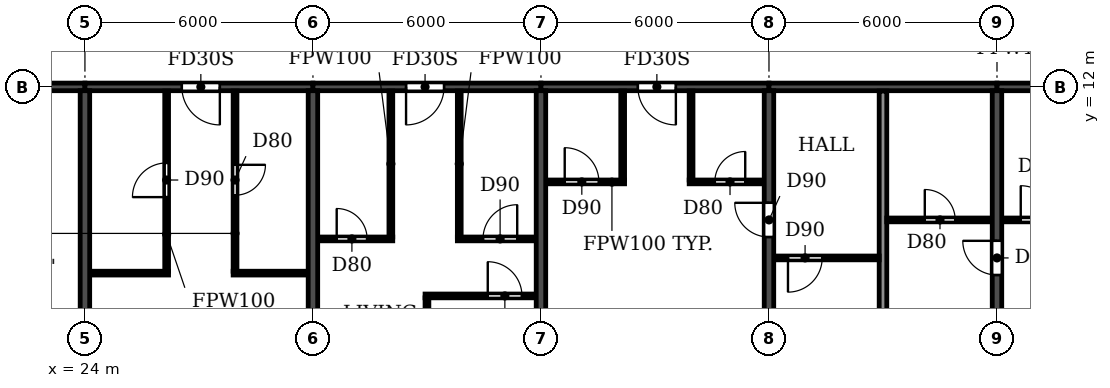
"""IFC4 building model, lengths in metres.
Left out: names, types, materials, properties, quantities, classifications, styles, units other than length and angle.
Written with IfcOpenShell. Run it as: python <this file> out.ifc"""

import sys

from ifc_helpers import new_model, si_unit, direction, frame, frame_2d, origin, place, context, subcontext, project, spatial, rectangle, extrude, element, fill, save


model = new_model("IFC4")
c1 = context("Model", 3, precision=1e-05, world=origin(), true_north=direction((0.0, 1.0)))
c2 = subcontext(c1, "Body", "Model", "MODEL_VIEW")
j1 = project(units=[si_unit("LENGTHUNIT", "METRE"), si_unit("PLANEANGLEUNIT", "RADIAN")], contexts=[c1])
p1 = place(None, origin())
s1 = spatial("IfcSite", under=j1, at=p1, CompositionType="ELEMENT")
p2 = place(p1, origin())
s2 = spatial("IfcBuilding", under=s1, at=p2, CompositionType="ELEMENT")
p3 = place(p2, frame((0.0, 0.0, 175.2)))
s3 = spatial("IfcBuildingStorey", under=s2, at=p3, CompositionType="ELEMENT", Elevation=175.2)
for number, where, z_axis, x_axis in (
    (1, (24.0, 0.2, 0.0), (0.0, 0.0, 1.0), (0.0, 1.0, 0.0)),
    (2, (30.0, 0.2, 0.0), (0.0, 0.0, 1.0), (0.0, 1.0, 0.0)),
    (3, (36.0, 0.2, 0.0), (0.0, 0.0, 1.0), (0.0, 1.0, 0.0)),
):
    element("IfcWall", number, at=place(p3, frame(where, z_axis=z_axis, x_axis=x_axis)), inside=s3, PredefinedType="SHEAR", context=c2, shape_type="SweptSolid", body=[
        extrude(rectangle(XDim=11.7, YDim=0.25, at=frame_2d((5.85, 0.0))), origin(), (0.0, 0.0, 1.0), 3.08),
    ])
p4 = place(p3, frame((42.0, 0.2, 0.0), z_axis=(0.0, 0.0, 1.0), x_axis=(0.0, 1.0, 0.0)))
e4 = element("IfcWall", 4, at=p4, inside=s3, PredefinedType="SHEAR", context=c2, shape_type="SweptSolid", body=[
    extrude(rectangle(XDim=11.7, YDim=0.25, at=frame_2d((5.85, 0.0))), origin(), (0.0, 0.0, 1.0), 3.08),
])
p5 = place(p4, frame((7.85, 0.0, 0.0)))
e5 = element("IfcOpeningElement", 5, at=p5, cuts=e4, PredefinedType="OPENING", context=c2, shape_type="SweptSolid", body=[
    extrude(rectangle(XDim=0.9, YDim=2.1, at=frame_2d((0.45, 1.05))), frame((0.0, 0.135, 0.0), z_axis=(0.0, -1.0, 0.0), x_axis=(1.0, 0.0, 0.0)), (0.0, 0.0, 1.0), 0.27),
])
p6 = place(p3, frame((48.0, 0.2, 0.0), z_axis=(0.0, 0.0, 1.0), x_axis=(0.0, 1.0, 0.0)))
e6 = element("IfcWall", 6, at=p6, inside=s3, PredefinedType="SHEAR", context=c2, shape_type="SweptSolid", body=[
    extrude(rectangle(XDim=11.7, YDim=0.25, at=frame_2d((5.85, 0.0))), origin(), (0.0, 0.0, 1.0), 3.08),
])
p7 = place(p6, frame((6.85, 0.0, 0.0)))
e7 = element("IfcOpeningElement", 7, at=p7, cuts=e6, PredefinedType="OPENING", context=c2, shape_type="SweptSolid", body=[
    extrude(rectangle(XDim=0.9, YDim=2.1, at=frame_2d((0.45, 1.05))), frame((0.0, 0.135, 0.0), z_axis=(0.0, -1.0, 0.0), x_axis=(1.0, 0.0, 0.0)), (0.0, 0.0, 1.0), 0.27),
])
p8 = place(p3, frame((18.2, 12.0, 0.0), z_axis=(0.0, 0.0, 1.0), x_axis=(1.0, 0.0, 0.0)))
e8 = element("IfcWall", 8, at=p8, inside=s3, PredefinedType="SHEAR", context=c2, shape_type="SweptSolid", body=[
    extrude(rectangle(XDim=5.8, YDim=0.2, at=frame_2d((2.9, 0.0))), origin(), (0.0, 0.0, 1.0), 2.48),
])
p9 = place(p8, frame((2.3, 0.0, 0.0)))
e9 = element("IfcOpeningElement", 9, at=p9, cuts=e8, PredefinedType="OPENING", context=c2, shape_type="SweptSolid", body=[
    extrude(rectangle(XDim=1.0, YDim=2.1, at=frame_2d((0.5, 1.05))), frame((0.0, 0.11, 0.0), z_axis=(0.0, -1.0, 0.0), x_axis=(1.0, 0.0, 0.0)), (0.0, 0.0, 1.0), 0.22),
])
p10 = place(p3, frame((24.0, 12.0, 0.0), z_axis=(0.0, 0.0, 1.0), x_axis=(1.0, 0.0, 0.0)))
e10 = element("IfcWall", 10, at=p10, inside=s3, PredefinedType="SHEAR", context=c2, shape_type="SweptSolid", body=[
    extrude(rectangle(XDim=6.0, YDim=0.2, at=frame_2d((3.0, 0.0))), origin(), (0.0, 0.0, 1.0), 2.48),
])
p11 = place(p10, frame((2.55, 0.0, 0.0)))
e11 = element("IfcOpeningElement", 11, at=p11, cuts=e10, PredefinedType="OPENING", context=c2, shape_type="SweptSolid", body=[
    extrude(rectangle(XDim=1.0, YDim=2.1, at=frame_2d((0.5, 1.05))), frame((0.0, 0.11, 0.0), z_axis=(0.0, -1.0, 0.0), x_axis=(1.0, 0.0, 0.0)), (0.0, 0.0, 1.0), 0.22),
])
p12 = place(p3, frame((30.0, 12.0, 0.0), z_axis=(0.0, 0.0, 1.0), x_axis=(1.0, 0.0, 0.0)))
e12 = element("IfcWall", 12, at=p12, inside=s3, PredefinedType="SHEAR", context=c2, shape_type="SweptSolid", body=[
    extrude(rectangle(XDim=6.0, YDim=0.2, at=frame_2d((3.0, 0.0))), origin(), (0.0, 0.0, 1.0), 2.48),
])
p13 = place(p12, frame((2.45, 0.0, 0.0)))
e13 = element("IfcOpeningElement", 13, at=p13, cuts=e12, PredefinedType="OPENING", context=c2, shape_type="SweptSolid", body=[
    extrude(rectangle(XDim=1.0, YDim=2.1, at=frame_2d((0.5, 1.05))), frame((0.0, 0.11, 0.0), z_axis=(0.0, -1.0, 0.0), x_axis=(1.0, 0.0, 0.0)), (0.0, 0.0, 1.0), 0.22),
])
p14 = place(p3, frame((36.0, 12.0, 0.0), z_axis=(0.0, 0.0, 1.0), x_axis=(1.0, 0.0, 0.0)))
e14 = element("IfcWall", 14, at=p14, inside=s3, PredefinedType="SHEAR", context=c2, shape_type="SweptSolid", body=[
    extrude(rectangle(XDim=6.0, YDim=0.2, at=frame_2d((3.0, 0.0))), origin(), (0.0, 0.0, 1.0), 2.48),
])
p15 = place(p14, frame((2.55, 0.0, 0.0)))
e15 = element("IfcOpeningElement", 15, at=p15, cuts=e14, PredefinedType="OPENING", context=c2, shape_type="SweptSolid", body=[
    extrude(rectangle(XDim=1.0, YDim=2.1, at=frame_2d((0.5, 1.05))), frame((0.0, 0.11, 0.0), z_axis=(0.0, -1.0, 0.0), x_axis=(1.0, 0.0, 0.0)), (0.0, 0.0, 1.0), 0.22),
])
p16 = place(p3, frame((42.0, 12.0, 0.0), z_axis=(0.0, 0.0, 1.0), x_axis=(1.0, 0.0, 0.0)))
e16 = element("IfcWall", 16, at=p16, inside=s3, PredefinedType="SHEAR", context=c2, shape_type="SweptSolid", body=[
    extrude(rectangle(XDim=6.0, YDim=0.2, at=frame_2d((3.0, 0.0))), origin(), (0.0, 0.0, 1.0), 2.48),
])
p17 = place(p3, frame((48.0, 12.0, 0.0), z_axis=(0.0, 0.0, 1.0), x_axis=(1.0, 0.0, 0.0)))
e17 = element("IfcWall", 17, at=p17, inside=s3, PredefinedType="SHEAR", context=c2, shape_type="SweptSolid", body=[
    extrude(rectangle(XDim=6.0, YDim=0.2, at=frame_2d((3.0, 0.0))), origin(), (0.0, 0.0, 1.0), 2.48),
])
p18 = place(p17, frame((2.55, 0.0, 0.0)))
e18 = element("IfcOpeningElement", 18, at=p18, cuts=e17, PredefinedType="OPENING", context=c2, shape_type="SweptSolid", body=[
    extrude(rectangle(XDim=1.0, YDim=2.1, at=frame_2d((0.5, 1.05))), frame((0.0, 0.11, 0.0), z_axis=(0.0, -1.0, 0.0), x_axis=(1.0, 0.0, 0.0)), (0.0, 0.0, 1.0), 0.22),
])
p19 = place(p3, frame((45.0, 0.06, 0.0), z_axis=(0.0, 0.0, 1.0), x_axis=(0.0, 1.0, 0.0)))
e19 = element("IfcWall", 19, at=p19, inside=s3, PredefinedType="PARTITIONING", context=c2, shape_type="SweptSolid", body=[
    extrude(rectangle(XDim=11.83, YDim=0.2, at=frame_2d((5.915, 0.0))), origin(), (0.0, 0.0, 1.0), 3.08),
])
p20 = place(p3, frame((32.95, 6.5, 0.0), z_axis=(0.0, 0.0, 1.0), x_axis=(1.0, 0.0, 0.0)))
e20 = element("IfcWall", 20, at=p20, inside=s3, PredefinedType="PARTITIONING", context=c2, shape_type="SweptSolid", body=[
    extrude(rectangle(XDim=2.915, YDim=0.1, at=frame_2d((1.458, 0.0))), origin(), (0.0, 0.0, 1.0), 3.08),
])
p21 = place(p20, frame((1.65, 0.0, 0.0)))
e21 = element("IfcOpeningElement", 21, at=p21, cuts=e20, PredefinedType="OPENING", context=c2, shape_type="SweptSolid", body=[
    extrude(rectangle(XDim=0.9, YDim=2.1, at=frame_2d((0.45, 1.05))), frame((0.0, 0.06, 0.0), z_axis=(0.0, -1.0, 0.0), x_axis=(1.0, 0.0, 0.0)), (0.0, 0.0, 1.0), 0.12),
])
p22 = place(p3, frame((24.135, 7.1, 0.0), z_axis=(0.0, 0.0, 1.0), x_axis=(1.0, 0.0, 0.0)))
e22 = element("IfcWall", 22, at=p22, inside=s3, PredefinedType="PARTITIONING", context=c2, shape_type="SweptSolid", body=[
    extrude(rectangle(XDim=2.065, YDim=0.1, at=frame_2d((1.032, 0.0))), origin(), (0.0, 0.0, 1.0), 3.08),
])
p23 = place(p3, frame((27.9, 7.1, 0.0), z_axis=(0.0, 0.0, 1.0), x_axis=(1.0, 0.0, 0.0)))
e23 = element("IfcWall", 23, at=p23, inside=s3, PredefinedType="PARTITIONING", context=c2, shape_type="SweptSolid", body=[
    extrude(rectangle(XDim=1.965, YDim=0.1, at=frame_2d((0.982, 0.0))), origin(), (0.0, 0.0, 1.0), 3.08),
])
p24 = place(p3, frame((42.135, 7.5, 0.0), z_axis=(0.0, 0.0, 1.0), x_axis=(1.0, 0.0, 0.0)))
e24 = element("IfcWall", 24, at=p24, inside=s3, PredefinedType="PARTITIONING", context=c2, shape_type="SweptSolid", body=[
    extrude(rectangle(XDim=2.765, YDim=0.1, at=frame_2d((1.382, 0.0))), origin(), (0.0, 0.0, 1.0), 3.08),
])
p25 = place(p24, frame((0.365, 0.0, 0.0)))
e25 = element("IfcOpeningElement", 25, at=p25, cuts=e24, PredefinedType="OPENING", context=c2, shape_type="SweptSolid", body=[
    extrude(rectangle(XDim=0.9, YDim=2.1, at=frame_2d((0.45, 1.05))), frame((0.0, 0.06, 0.0), z_axis=(0.0, -1.0, 0.0), x_axis=(1.0, 0.0, 0.0)), (0.0, 0.0, 1.0), 0.12),
])
p26 = place(p3, frame((30.135, 8.0, 0.0), z_axis=(0.0, 0.0, 1.0), x_axis=(1.0, 0.0, 0.0)))
e26 = element("IfcWall", 26, at=p26, inside=s3, PredefinedType="PARTITIONING", context=c2, shape_type="SweptSolid", body=[
    extrude(rectangle(XDim=1.965, YDim=0.1, at=frame_2d((0.982, 0.0))), origin(), (0.0, 0.0, 1.0), 3.08),
])
p27 = place(p26, frame((0.49, 0.0, 0.0)))
e27 = element("IfcOpeningElement", 27, at=p27, cuts=e26, PredefinedType="OPENING", context=c2, shape_type="SweptSolid", body=[
    extrude(rectangle(XDim=0.8, YDim=2.1, at=frame_2d((0.4, 1.05))), frame((0.0, 0.06, 0.0), z_axis=(0.0, -1.0, 0.0), x_axis=(1.0, 0.0, 0.0)), (0.0, 0.0, 1.0), 0.12),
])
p28 = place(p3, frame((33.8, 8.0, 0.0), z_axis=(0.0, 0.0, 1.0), x_axis=(1.0, 0.0, 0.0)))
e28 = element("IfcWall", 28, at=p28, inside=s3, PredefinedType="PARTITIONING", context=c2, shape_type="SweptSolid", body=[
    extrude(rectangle(XDim=2.065, YDim=0.1, at=frame_2d((1.032, 0.0))), origin(), (0.0, 0.0, 1.0), 3.08),
])
p29 = place(p28, frame((0.675, 0.0, 0.0)))
e29 = element("IfcOpeningElement", 29, at=p29, cuts=e28, PredefinedType="OPENING", context=c2, shape_type="SweptSolid", body=[
    extrude(rectangle(XDim=0.9, YDim=2.1, at=frame_2d((0.45, 1.05))), frame((0.0, 0.06, 0.0), z_axis=(0.0, -1.0, 0.0), x_axis=(1.0, 0.0, 0.0)), (0.0, 0.0, 1.0), 0.12),
])
p30 = place(p3, frame((45.1, 8.5, 0.0), z_axis=(0.0, 0.0, 1.0), x_axis=(1.0, 0.0, 0.0)))
e30 = element("IfcWall", 30, at=p30, inside=s3, PredefinedType="PARTITIONING", context=c2, shape_type="SweptSolid", body=[
    extrude(rectangle(XDim=2.765, YDim=0.1, at=frame_2d((1.382, 0.0))), origin(), (0.0, 0.0, 1.0), 3.08),
])
p31 = place(p30, frame((1.0, 0.0, 0.0)))
e31 = element("IfcOpeningElement", 31, at=p31, cuts=e30, PredefinedType="OPENING", context=c2, shape_type="SweptSolid", body=[
    extrude(rectangle(XDim=0.8, YDim=2.1, at=frame_2d((0.4, 1.05))), frame((0.0, 0.06, 0.0), z_axis=(0.0, -1.0, 0.0), x_axis=(1.0, 0.0, 0.0)), (0.0, 0.0, 1.0), 0.12),
])
p32 = place(p3, frame((48.135, 8.5, 0.0), z_axis=(0.0, 0.0, 1.0), x_axis=(1.0, 0.0, 0.0)))
e32 = element("IfcWall", 32, at=p32, inside=s3, PredefinedType="PARTITIONING", context=c2, shape_type="SweptSolid", body=[
    extrude(rectangle(XDim=2.065, YDim=0.1, at=frame_2d((1.032, 0.0))), origin(), (0.0, 0.0, 1.0), 3.08),
])
p33 = place(p32, frame((0.49, 0.0, 0.0)))
e33 = element("IfcOpeningElement", 33, at=p33, cuts=e32, PredefinedType="OPENING", context=c2, shape_type="SweptSolid", body=[
    extrude(rectangle(XDim=0.9, YDim=2.1, at=frame_2d((0.45, 1.05))), frame((0.0, 0.06, 0.0), z_axis=(0.0, -1.0, 0.0), x_axis=(1.0, 0.0, 0.0)), (0.0, 0.0, 1.0), 0.12),
])
p34 = place(p3, frame((36.135, 9.5, 0.0), z_axis=(0.0, 0.0, 1.0), x_axis=(1.0, 0.0, 0.0)))
e34 = element("IfcWall", 34, at=p34, inside=s3, PredefinedType="PARTITIONING", context=c2, shape_type="SweptSolid", body=[
    extrude(rectangle(XDim=2.065, YDim=0.1, at=frame_2d((1.032, 0.0))), origin(), (0.0, 0.0, 1.0), 3.08),
])
p35 = place(p34, frame((0.49, 0.0, 0.0)))
e35 = element("IfcOpeningElement", 35, at=p35, cuts=e34, PredefinedType="OPENING", context=c2, shape_type="SweptSolid", body=[
    extrude(rectangle(XDim=0.9, YDim=2.1, at=frame_2d((0.45, 1.05))), frame((0.0, 0.06, 0.0), z_axis=(0.0, -1.0, 0.0), x_axis=(1.0, 0.0, 0.0)), (0.0, 0.0, 1.0), 0.12),
])
p36 = place(p3, frame((39.9, 9.5, 0.0), z_axis=(0.0, 0.0, 1.0), x_axis=(1.0, 0.0, 0.0)))
e36 = element("IfcWall", 36, at=p36, inside=s3, PredefinedType="PARTITIONING", context=c2, shape_type="SweptSolid", body=[
    extrude(rectangle(XDim=1.965, YDim=0.1, at=frame_2d((0.982, 0.0))), origin(), (0.0, 0.0, 1.0), 3.08),
])
p37 = place(p36, frame((0.675, 0.0, 0.0)))
e37 = element("IfcOpeningElement", 37, at=p37, cuts=e36, PredefinedType="OPENING", context=c2, shape_type="SweptSolid", body=[
    extrude(rectangle(XDim=0.8, YDim=2.1, at=frame_2d((0.4, 1.05))), frame((0.0, 0.06, 0.0), z_axis=(0.0, -1.0, 0.0), x_axis=(1.0, 0.0, 0.0)), (0.0, 0.0, 1.0), 0.12),
])
p38 = place(p3, frame((26.15, 7.15, 0.0), z_axis=(0.0, 0.0, 1.0), x_axis=(0.0, 1.0, 0.0)))
e38 = element("IfcWall", 38, at=p38, inside=s3, PredefinedType="PARTITIONING", context=c2, shape_type="SweptSolid", body=[
    extrude(rectangle(XDim=4.74, YDim=0.1, at=frame_2d((2.37, 0.0))), origin(), (0.0, 0.0, 1.0), 3.08),
])
p39 = place(p38, frame((1.95, 0.0, 0.0)))
e39 = element("IfcOpeningElement", 39, at=p39, cuts=e38, PredefinedType="OPENING", context=c2, shape_type="SweptSolid", body=[
    extrude(rectangle(XDim=0.9, YDim=2.1, at=frame_2d((0.45, 1.05))), frame((0.0, 0.06, 0.0), z_axis=(0.0, -1.0, 0.0), x_axis=(1.0, 0.0, 0.0)), (0.0, 0.0, 1.0), 0.12),
])
p40 = place(p3, frame((27.95, 7.15, 0.0), z_axis=(0.0, 0.0, 1.0), x_axis=(0.0, 1.0, 0.0)))
e40 = element("IfcWall", 40, at=p40, inside=s3, PredefinedType="PARTITIONING", context=c2, shape_type="SweptSolid", body=[
    extrude(rectangle(XDim=4.74, YDim=0.1, at=frame_2d((2.37, 0.0))), origin(), (0.0, 0.0, 1.0), 3.08),
])
p41 = place(p40, frame((2.0, 0.0, 0.0)))
e41 = element("IfcOpeningElement", 41, at=p41, cuts=e40, PredefinedType="OPENING", context=c2, shape_type="SweptSolid", body=[
    extrude(rectangle(XDim=0.8, YDim=2.1, at=frame_2d((0.4, 1.05))), frame((0.0, 0.06, 0.0), z_axis=(0.0, -1.0, 0.0), x_axis=(1.0, 0.0, 0.0)), (0.0, 0.0, 1.0), 0.12),
])
p42 = place(p3, frame((32.05, 8.05, 0.0), z_axis=(0.0, 0.0, 1.0), x_axis=(0.0, 1.0, 0.0)))
e42 = element("IfcWall", 42, at=p42, inside=s3, PredefinedType="PARTITIONING", context=c2, shape_type="SweptSolid", body=[
    extrude(rectangle(XDim=3.84, YDim=0.1, at=frame_2d((1.92, 0.0))), origin(), (0.0, 0.0, 1.0), 3.08),
])
p43 = place(p3, frame((33.0, 0.06, 0.0), z_axis=(0.0, 0.0, 1.0), x_axis=(0.0, 1.0, 0.0)))
e43 = element("IfcWall", 43, at=p43, inside=s3, PredefinedType="PARTITIONING", context=c2, shape_type="SweptSolid", body=[
    extrude(rectangle(XDim=6.39, YDim=0.1, at=frame_2d((3.195, 0.0))), origin(), (0.0, 0.0, 1.0), 3.08),
])
p44 = place(p3, frame((33.85, 8.05, 0.0), z_axis=(0.0, 0.0, 1.0), x_axis=(0.0, 1.0, 0.0)))
e44 = element("IfcWall", 44, at=p44, inside=s3, PredefinedType="PARTITIONING", context=c2, shape_type="SweptSolid", body=[
    extrude(rectangle(XDim=3.84, YDim=0.1, at=frame_2d((1.92, 0.0))), origin(), (0.0, 0.0, 1.0), 3.08),
])
for number, where, z_axis, x_axis in (
    (45, (38.15, 9.55, 0.0), (0.0, 0.0, 1.0), (0.0, 1.0, 0.0)),
    (46, (39.95, 9.55, 0.0), (0.0, 0.0, 1.0), (0.0, 1.0, 0.0)),
):
    element("IfcWall", number, at=place(p3, frame(where, z_axis=z_axis, x_axis=x_axis)), inside=s3, PredefinedType="PARTITIONING", context=c2, shape_type="SweptSolid", body=[
        extrude(rectangle(XDim=2.34, YDim=0.1, at=frame_2d((1.17, 0.0))), origin(), (0.0, 0.0, 1.0), 3.08),
    ])
p45 = place(p39, origin())
e47 = element("IfcDoor", 47, at=p45, inside=s3, OperationType="SINGLE_SWING_LEFT", PredefinedType="DOOR", context=c2, shape_type="SweptSolid", body=[
    extrude(rectangle(XDim=0.9, YDim=2.1, at=frame_2d((0.45, 1.05))), frame((0.0, 0.025, 0.0), z_axis=(0.0, -1.0, 0.0), x_axis=(1.0, 0.0, 0.0)), (0.0, 0.0, 1.0), 0.05),
])
fill(e39, e47)
p46 = place(p11, frame((1.0, 0.0, 0.0), z_axis=(0.0, 0.0, 1.0), x_axis=(-1.0, 0.0, 0.0)))
e48 = element("IfcDoor", 48, at=p46, inside=s3, OperationType="SINGLE_SWING_LEFT", PredefinedType="DOOR", context=c2, shape_type="SweptSolid", body=[
    extrude(rectangle(XDim=1.0, YDim=2.1, at=frame_2d((0.5, 1.05))), frame((0.0, 0.025, 0.0), z_axis=(0.0, -1.0, 0.0), x_axis=(1.0, 0.0, 0.0)), (0.0, 0.0, 1.0), 0.05),
])
fill(e11, e48)
p47 = place(p41, frame((0.8, 0.0, 0.0), z_axis=(0.0, 0.0, 1.0), x_axis=(-1.0, 0.0, 0.0)))
e49 = element("IfcDoor", 49, at=p47, inside=s3, OperationType="SINGLE_SWING_LEFT", PredefinedType="DOOR", context=c2, shape_type="SweptSolid", body=[
    extrude(rectangle(XDim=0.8, YDim=2.1, at=frame_2d((0.4, 1.05))), frame((0.0, 0.025, 0.0), z_axis=(0.0, -1.0, 0.0), x_axis=(1.0, 0.0, 0.0)), (0.0, 0.0, 1.0), 0.05),
])
fill(e41, e49)
p48 = place(p27, origin())
e50 = element("IfcDoor", 50, at=p48, inside=s3, OperationType="SINGLE_SWING_LEFT", PredefinedType="DOOR", context=c2, shape_type="SweptSolid", body=[
    extrude(rectangle(XDim=0.8, YDim=2.1, at=frame_2d((0.4, 1.05))), frame((0.0, 0.025, 0.0), z_axis=(0.0, -1.0, 0.0), x_axis=(1.0, 0.0, 0.0)), (0.0, 0.0, 1.0), 0.05),
])
fill(e27, e50)
p49 = place(p13, frame((1.0, 0.0, 0.0), z_axis=(0.0, 0.0, 1.0), x_axis=(-1.0, 0.0, 0.0)))
e51 = element("IfcDoor", 51, at=p49, inside=s3, OperationType="SINGLE_SWING_RIGHT", PredefinedType="DOOR", context=c2, shape_type="SweptSolid", body=[
    extrude(rectangle(XDim=1.0, YDim=2.1, at=frame_2d((0.5, 1.05))), frame((0.0, 0.025, 0.0), z_axis=(0.0, -1.0, 0.0), x_axis=(1.0, 0.0, 0.0)), (0.0, 0.0, 1.0), 0.05),
])
fill(e13, e51)
p50 = place(p29, origin())
e52 = element("IfcDoor", 52, at=p50, inside=s3, OperationType="SINGLE_SWING_RIGHT", PredefinedType="DOOR", context=c2, shape_type="SweptSolid", body=[
    extrude(rectangle(XDim=0.9, YDim=2.1, at=frame_2d((0.45, 1.05))), frame((0.0, 0.025, 0.0), z_axis=(0.0, -1.0, 0.0), x_axis=(1.0, 0.0, 0.0)), (0.0, 0.0, 1.0), 0.05),
])
fill(e29, e52)
p51 = place(p21, origin())
e53 = element("IfcDoor", 53, at=p51, inside=s3, OperationType="SINGLE_SWING_LEFT", PredefinedType="DOOR", context=c2, shape_type="SweptSolid", body=[
    extrude(rectangle(XDim=0.9, YDim=2.1, at=frame_2d((0.45, 1.05))), frame((0.0, 0.025, 0.0), z_axis=(0.0, -1.0, 0.0), x_axis=(1.0, 0.0, 0.0)), (0.0, 0.0, 1.0), 0.05),
])
fill(e21, e53)
p52 = place(p25, frame((0.9, 0.0, 0.0), z_axis=(0.0, 0.0, 1.0), x_axis=(-1.0, 0.0, 0.0)))
e54 = element("IfcDoor", 54, at=p52, inside=s3, OperationType="SINGLE_SWING_RIGHT", PredefinedType="DOOR", context=c2, shape_type="SweptSolid", body=[
    extrude(rectangle(XDim=0.9, YDim=2.1, at=frame_2d((0.45, 1.05))), frame((0.0, 0.025, 0.0), z_axis=(0.0, -1.0, 0.0), x_axis=(1.0, 0.0, 0.0)), (0.0, 0.0, 1.0), 0.05),
])
fill(e25, e54)
p53 = place(p35, origin())
e55 = element("IfcDoor", 55, at=p53, inside=s3, OperationType="SINGLE_SWING_LEFT", PredefinedType="DOOR", context=c2, shape_type="SweptSolid", body=[
    extrude(rectangle(XDim=0.9, YDim=2.1, at=frame_2d((0.45, 1.05))), frame((0.0, 0.025, 0.0), z_axis=(0.0, -1.0, 0.0), x_axis=(1.0, 0.0, 0.0)), (0.0, 0.0, 1.0), 0.05),
])
fill(e35, e55)
p54 = place(p15, frame((1.0, 0.0, 0.0), z_axis=(0.0, 0.0, 1.0), x_axis=(-1.0, 0.0, 0.0)))
e56 = element("IfcDoor", 56, at=p54, inside=s3, OperationType="SINGLE_SWING_LEFT", PredefinedType="DOOR", context=c2, shape_type="SweptSolid", body=[
    extrude(rectangle(XDim=1.0, YDim=2.1, at=frame_2d((0.5, 1.05))), frame((0.0, 0.025, 0.0), z_axis=(0.0, -1.0, 0.0), x_axis=(1.0, 0.0, 0.0)), (0.0, 0.0, 1.0), 0.05),
])
fill(e15, e56)
p55 = place(p37, origin())
e57 = element("IfcDoor", 57, at=p55, inside=s3, OperationType="SINGLE_SWING_RIGHT", PredefinedType="DOOR", context=c2, shape_type="SweptSolid", body=[
    extrude(rectangle(XDim=0.8, YDim=2.1, at=frame_2d((0.4, 1.05))), frame((0.0, 0.025, 0.0), z_axis=(0.0, -1.0, 0.0), x_axis=(1.0, 0.0, 0.0)), (0.0, 0.0, 1.0), 0.05),
])
fill(e37, e57)
p56 = place(p5, origin())
e58 = element("IfcDoor", 58, at=p56, inside=s3, OperationType="SINGLE_SWING_RIGHT", PredefinedType="DOOR", context=c2, shape_type="SweptSolid", body=[
    extrude(rectangle(XDim=0.9, YDim=2.1, at=frame_2d((0.45, 1.05))), frame((0.0, 0.025, 0.0), z_axis=(0.0, -1.0, 0.0), x_axis=(1.0, 0.0, 0.0)), (0.0, 0.0, 1.0), 0.05),
])
fill(e5, e58)
p57 = place(p31, origin())
e59 = element("IfcDoor", 59, at=p57, inside=s3, OperationType="SINGLE_SWING_LEFT", PredefinedType="DOOR", context=c2, shape_type="SweptSolid", body=[
    extrude(rectangle(XDim=0.8, YDim=2.1, at=frame_2d((0.4, 1.05))), frame((0.0, 0.025, 0.0), z_axis=(0.0, -1.0, 0.0), x_axis=(1.0, 0.0, 0.0)), (0.0, 0.0, 1.0), 0.05),
])
fill(e31, e59)
p58 = place(p7, origin())
e60 = element("IfcDoor", 60, at=p58, inside=s3, OperationType="SINGLE_SWING_RIGHT", PredefinedType="DOOR", context=c2, shape_type="SweptSolid", body=[
    extrude(rectangle(XDim=0.9, YDim=2.1, at=frame_2d((0.45, 1.05))), frame((0.0, 0.025, 0.0), z_axis=(0.0, -1.0, 0.0), x_axis=(1.0, 0.0, 0.0)), (0.0, 0.0, 1.0), 0.05),
])
fill(e7, e60)
p59 = place(p33, origin())
e61 = element("IfcDoor", 61, at=p59, inside=s3, OperationType="SINGLE_SWING_LEFT", PredefinedType="DOOR", context=c2, shape_type="SweptSolid", body=[
    extrude(rectangle(XDim=0.9, YDim=2.1, at=frame_2d((0.45, 1.05))), frame((0.0, 0.025, 0.0), z_axis=(0.0, -1.0, 0.0), x_axis=(1.0, 0.0, 0.0)), (0.0, 0.0, 1.0), 0.05),
])
fill(e33, e61)
save(model, sys.argv[1])
